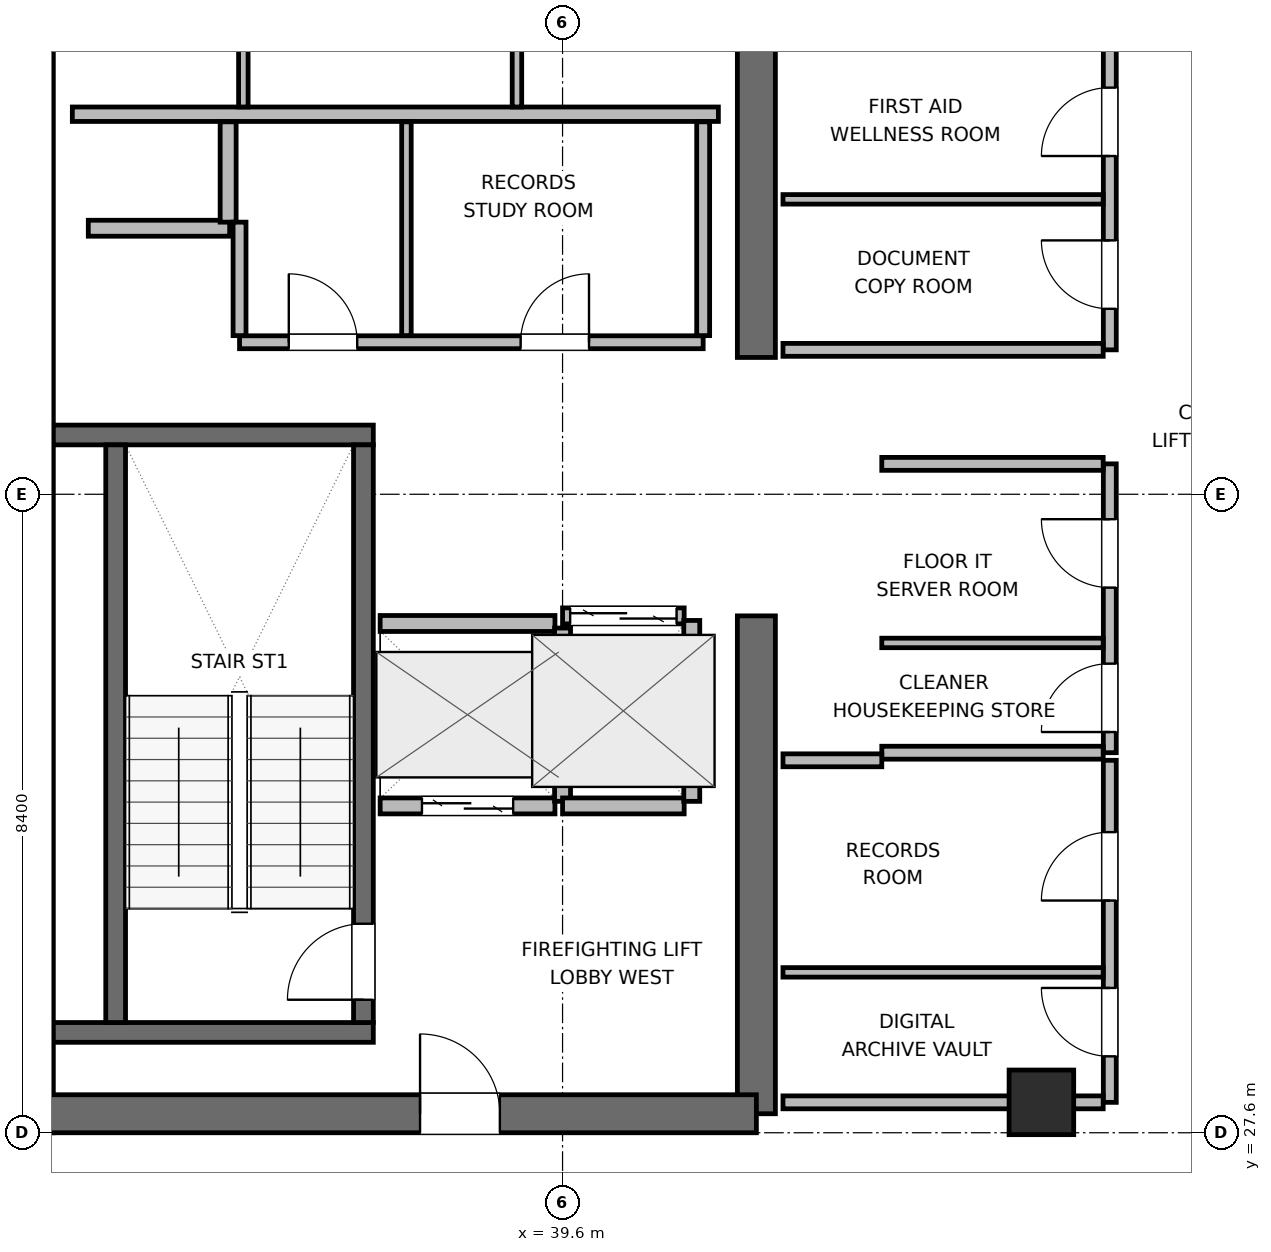
"""IFC4 building model, lengths in metres.
Left out: names, types, materials, properties, quantities, classifications, styles, units other than length and angle.
Written with IfcOpenShell. Run it as: python <this file> out.ifc"""

import sys

from ifc_helpers import new_model, si_unit, direction, frame, frame_2d, origin, origin_2d, place, context, subcontext, project, spatial, rectangle, extrude, element, fill, save


model = new_model("IFC4")
c1 = context("Model", 3, precision=1e-05, world=origin(), true_north=direction((0.0, 1.0)))
c2 = subcontext(c1, "Body", "Model", "MODEL_VIEW")
j1 = project(units=[si_unit("LENGTHUNIT", "METRE"), si_unit("PLANEANGLEUNIT", "RADIAN")], contexts=[c1])
p1 = place(None, origin())
s1 = spatial("IfcSite", under=j1, at=p1, CompositionType="ELEMENT")
p2 = place(p1, origin())
s2 = spatial("IfcBuilding", under=s1, at=p2, CompositionType="ELEMENT")
p3 = place(p2, frame((0.0, 0.0, 270.6)))
s3 = spatial("IfcBuildingStorey", under=s2, at=p3, CompositionType="ELEMENT", Elevation=270.6)
p4 = place(p3, frame((32.65, 27.6, 0.0), z_axis=(0.0, 0.0, 1.0), x_axis=(0.0, 1.0, 0.0)))
e1 = element("IfcWall", 1, at=p4, inside=s3, PredefinedType="SHEAR", context=c2, shape_type="SweptSolid", body=[
    extrude(rectangle(XDim=16.8, YDim=0.5, at=frame_2d((8.4, 0.0))), origin(), (0.0, 0.0, 1.0), 3.9),
])
p5 = place(p3, frame((42.15, 27.85, 0.0), z_axis=(0.0, 0.0, 1.0), x_axis=(0.0, 1.0, 0.0)))
e2 = element("IfcWall", 2, at=p5, inside=s3, PredefinedType="SHEAR", context=c2, shape_type="SweptSolid", body=[
    extrude(rectangle(XDim=6.55, YDim=0.5, at=frame_2d((3.275, 0.0))), origin(), (0.0, 0.0, 1.0), 3.9),
])
p6 = place(p3, frame((42.15, 37.8, 0.0), z_axis=(0.0, 0.0, 1.0), x_axis=(0.0, 1.0, 0.0)))
e3 = element("IfcWall", 3, at=p6, inside=s3, PredefinedType="SHEAR", context=c2, shape_type="SweptSolid", body=[
    extrude(rectangle(XDim=6.35, YDim=0.5, at=frame_2d((3.175, 0.0))), origin(), (0.0, 0.0, 1.0), 3.9),
])
p7 = place(p3, frame((32.65, 27.85, 0.0), z_axis=(0.0, 0.0, 1.0), x_axis=(1.0, 0.0, 0.0)))
e4 = element("IfcWall", 4, at=p7, inside=s3, PredefinedType="SHEAR", context=c2, shape_type="SweptSolid", body=[
    extrude(rectangle(XDim=9.5, YDim=0.5, at=frame_2d((4.75, 0.0))), origin(), (0.0, 0.0, 1.0), 3.9),
])
p8 = place(p7, frame((5.075, 0.0, 0.0)))
e5 = element("IfcOpeningElement", 5, at=p8, cuts=e4, PredefinedType="OPENING", context=c2, shape_type="SweptSolid", body=[
    extrude(rectangle(XDim=1.05, YDim=2.04, at=frame_2d((0.525, 1.02))), frame((0.0, 0.26, 0.0), z_axis=(0.0, -1.0, 0.0), x_axis=(1.0, 0.0, 0.0)), (0.0, 0.0, 1.0), 0.52),
])
for number, where, z_axis, x_axis in (
    (6, (32.9, 28.92, 0.0), (0.0, 0.0, 1.0), (1.0, 0.0, 0.0)),
    (7, (32.9, 36.78, 0.0), (0.0, 0.0, 1.0), (1.0, 0.0, 0.0)),
):
    element("IfcWall", number, at=place(p3, frame(where, z_axis=z_axis, x_axis=x_axis)), inside=s3, PredefinedType="SHEAR", context=c2, shape_type="SweptSolid", body=[
        extrude(rectangle(XDim=4.21, YDim=0.26, at=frame_2d((2.105, 0.0))), origin(), (0.0, 0.0, 1.0), 3.9),
    ])
p9 = place(p3, frame((33.72, 29.05, 0.0), z_axis=(0.0, 0.0, 1.0), x_axis=(0.0, 1.0, 0.0)))
e8 = element("IfcWall", 8, at=p9, inside=s3, PredefinedType="SHEAR", context=c2, shape_type="SweptSolid", body=[
    extrude(rectangle(XDim=7.6, YDim=0.26, at=frame_2d((3.8, 0.0))), origin(), (0.0, 0.0, 1.0), 3.9),
])
p10 = place(p3, frame((36.98, 29.05, 0.0), z_axis=(0.0, 0.0, 1.0), x_axis=(0.0, 1.0, 0.0)))
e9 = element("IfcWall", 9, at=p10, inside=s3, PredefinedType="SHEAR", context=c2, shape_type="SweptSolid", body=[
    extrude(rectangle(XDim=7.6, YDim=0.26, at=frame_2d((3.8, 0.0))), origin(), (0.0, 0.0, 1.0), 3.9),
])
p11 = place(p10, frame((0.3, 0.0, 0.0)))
e10 = element("IfcOpeningElement", 10, at=p11, cuts=e9, PredefinedType="OPENING", context=c2, shape_type="SweptSolid", body=[
    extrude(rectangle(XDim=1.0, YDim=2.04, at=frame_2d((0.5, 1.02))), frame((0.0, 0.14, 0.0), z_axis=(0.0, -1.0, 0.0), x_axis=(1.0, 0.0, 0.0)), (0.0, 0.0, 1.0), 0.28),
])
p12 = place(p3, frame((45.9, 28.0, 0.0), z_axis=(0.0, 0.0, 1.0), x_axis=(1.0, 0.0, 0.0)))
e11 = element("IfcColumn", 11, at=p12, inside=s3, PredefinedType="COLUMN", context=c2, shape_type="SweptSolid", body=[
    extrude(rectangle(XDim=0.85, YDim=0.85, at=origin_2d()), origin(), (0.0, 0.0, 1.0), 3.9),
])
p13 = place(p3, frame((33.15, 41.0, 0.0), z_axis=(0.0, 0.0, 1.0), x_axis=(1.0, 0.0, 0.0)))
e12 = element("IfcWall", 12, at=p13, inside=s3, PredefinedType="PLUMBINGWALL", context=c2, shape_type="SweptSolid", body=[
    extrude(rectangle(XDim=8.5, YDim=0.19, at=frame_2d((4.25, 0.0))), origin(), (0.0, 0.0, 1.0), 3.68),
])
for number, where, z_axis, x_axis in (
    (13, (35.4, 41.095, 0.0), (0.0, 0.0, 1.0), (0.0, 1.0, 0.0)),
    (14, (39.0, 41.095, 0.0), (0.0, 0.0, 1.0), (0.0, 1.0, 0.0)),
):
    element("IfcWall", number, at=place(p3, frame(where, z_axis=z_axis, x_axis=x_axis)), inside=s3, PredefinedType="PARTITIONING", context=c2, shape_type="SweptSolid", body=[
        extrude(rectangle(XDim=2.555, YDim=0.125, at=frame_2d((1.277, 0.0))), origin(), (0.0, 0.0, 1.0), 3.68),
    ])
p14 = place(p3, frame((33.36, 39.5, 0.0), z_axis=(0.0, 0.0, 1.0), x_axis=(1.0, 0.0, 0.0)))
e15 = element("IfcWall", 15, at=p14, inside=s3, PredefinedType="PARTITIONING", context=c2, shape_type="SweptSolid", body=[
    extrude(rectangle(XDim=1.86, YDim=0.21, at=frame_2d((0.93, 0.0))), origin(), (0.0, 0.0, 1.0), 3.68),
])
p15 = place(p3, frame((35.2, 39.58, 0.0), z_axis=(0.0, 0.0, 1.0), x_axis=(0.0, 1.0, 0.0)))
e16 = element("IfcWall", 16, at=p15, inside=s3, PredefinedType="PARTITIONING", context=c2, shape_type="SweptSolid", body=[
    extrude(rectangle(XDim=1.32, YDim=0.21, at=frame_2d((0.66, 0.0))), origin(), (0.0, 0.0, 1.0), 3.68),
])
p16 = place(p3, frame((37.2, 31.9, 0.0), z_axis=(0.0, 0.0, 1.0), x_axis=(1.0, 0.0, 0.0)))
e17 = element("IfcWall", 17, at=p16, inside=s3, PredefinedType="PARTITIONING", context=c2, shape_type="SweptSolid", body=[
    extrude(rectangle(XDim=2.3, YDim=0.21, at=frame_2d((1.15, 0.0))), origin(), (0.0, 0.0, 1.0), 3.68),
])
p17 = place(p16, frame((0.55, 0.0, 0.0)))
e18 = element("IfcOpeningElement", 18, at=p17, cuts=e17, PredefinedType="OPENING", context=c2, shape_type="SweptSolid", body=[
    extrude(rectangle(XDim=1.2, YDim=2.04, at=frame_2d((0.6, 1.02))), frame((0.0, 0.115, 0.0), z_axis=(0.0, -1.0, 0.0), x_axis=(1.0, 0.0, 0.0)), (0.0, 0.0, 1.0), 0.23),
])
p18 = place(p3, frame((37.2, 34.3, 0.0), z_axis=(0.0, 0.0, 1.0), x_axis=(1.0, 0.0, 0.0)))
e19 = element("IfcWall", 19, at=p18, inside=s3, PredefinedType="PARTITIONING", context=c2, shape_type="SweptSolid", body=[
    extrude(rectangle(XDim=2.3, YDim=0.21, at=frame_2d((1.15, 0.0))), origin(), (0.0, 0.0, 1.0), 3.68),
])
p19 = place(p3, frame((39.6, 31.96, 0.0), z_axis=(0.0, 0.0, 1.0), x_axis=(0.0, 1.0, 0.0)))
e20 = element("IfcWall", 20, at=p19, inside=s3, PredefinedType="PARTITIONING", context=c2, shape_type="SweptSolid", body=[
    extrude(rectangle(XDim=2.28, YDim=0.21, at=frame_2d((1.14, 0.0))), origin(), (0.0, 0.0, 1.0), 3.68),
])
p20 = place(p3, frame((39.6, 34.4, 0.0), z_axis=(0.0, 0.0, 1.0), x_axis=(1.0, 0.0, 0.0)))
e21 = element("IfcWall", 21, at=p20, inside=s3, PredefinedType="PARTITIONING", context=c2, shape_type="SweptSolid", body=[
    extrude(rectangle(XDim=1.6, YDim=0.21, at=frame_2d((0.8, 0.0))), origin(), (0.0, 0.0, 1.0), 3.68),
])
p21 = place(p20, frame((0.1, 0.0, 0.0)))
e22 = element("IfcOpeningElement", 22, at=p21, cuts=e21, PredefinedType="OPENING", context=c2, shape_type="SweptSolid", body=[
    extrude(rectangle(XDim=1.4, YDim=2.06, at=frame_2d((0.7, 1.03))), frame((0.0, 0.115, 0.0), z_axis=(0.0, -1.0, 0.0), x_axis=(1.0, 0.0, 0.0)), (0.0, 0.0, 1.0), 0.23),
])
p22 = place(p3, frame((39.6, 31.9, 0.0), z_axis=(0.0, 0.0, 1.0), x_axis=(1.0, 0.0, 0.0)))
e23 = element("IfcWall", 23, at=p22, inside=s3, PredefinedType="PARTITIONING", context=c2, shape_type="SweptSolid", body=[
    extrude(rectangle(XDim=1.6, YDim=0.21, at=frame_2d((0.8, 0.0))), origin(), (0.0, 0.0, 1.0), 3.68),
])
p23 = place(p3, frame((41.3, 31.96, 0.0), z_axis=(0.0, 0.0, 1.0), x_axis=(0.0, 1.0, 0.0)))
e24 = element("IfcWall", 24, at=p23, inside=s3, PredefinedType="PARTITIONING", context=c2, shape_type="SweptSolid", body=[
    extrude(rectangle(XDim=2.38, YDim=0.21, at=frame_2d((1.19, 0.0))), origin(), (0.0, 0.0, 1.0), 3.68),
])
p24 = place(p3, frame((35.35, 38.0, 0.0), z_axis=(0.0, 0.0, 1.0), x_axis=(1.0, 0.0, 0.0)))
e25 = element("IfcWall", 25, at=p24, inside=s3, PredefinedType="PARTITIONING", context=c2, shape_type="SweptSolid", body=[
    extrude(rectangle(XDim=6.1, YDim=0.17, at=frame_2d((3.05, 0.0))), origin(), (0.0, 0.0, 1.0), 3.68),
])
p25 = place(p24, frame((0.648, 0.0, 0.0)))
e26 = element("IfcOpeningElement", 26, at=p25, cuts=e25, PredefinedType="OPENING", context=c2, shape_type="SweptSolid", body=[
    extrude(rectangle(XDim=0.9, YDim=2.02, at=frame_2d((0.45, 1.01))), frame((0.0, 0.095, 0.0), z_axis=(0.0, -1.0, 0.0), x_axis=(1.0, 0.0, 0.0)), (0.0, 0.0, 1.0), 0.19),
])
p26 = place(p24, frame((3.698, 0.0, 0.0)))
e27 = element("IfcOpeningElement", 27, at=p26, cuts=e25, PredefinedType="OPENING", context=c2, shape_type="SweptSolid", body=[
    extrude(rectangle(XDim=0.9, YDim=2.02, at=frame_2d((0.45, 1.01))), frame((0.0, 0.095, 0.0), z_axis=(0.0, -1.0, 0.0), x_axis=(1.0, 0.0, 0.0)), (0.0, 0.0, 1.0), 0.19),
])
p27 = place(p3, frame((35.35, 38.087, 0.0), z_axis=(0.0, 0.0, 1.0), x_axis=(0.0, 1.0, 0.0)))
e28 = element("IfcWall", 28, at=p27, inside=s3, PredefinedType="PARTITIONING", context=c2, shape_type="SweptSolid", body=[
    extrude(rectangle(XDim=1.493, YDim=0.17, at=frame_2d((0.747, 0.0))), origin(), (0.0, 0.0, 1.0), 3.68),
])
p28 = place(p3, frame((41.45, 38.087, 0.0), z_axis=(0.0, 0.0, 1.0), x_axis=(0.0, 1.0, 0.0)))
e29 = element("IfcWall", 29, at=p28, inside=s3, PredefinedType="PARTITIONING", context=c2, shape_type="SweptSolid", body=[
    extrude(rectangle(XDim=2.813, YDim=0.17, at=frame_2d((1.406, 0.0))), origin(), (0.0, 0.0, 1.0), 3.68),
])
p29 = place(p3, frame((37.546, 38.087, 0.0), z_axis=(0.0, 0.0, 1.0), x_axis=(0.0, 1.0, 0.0)))
e30 = element("IfcWall", 30, at=p29, inside=s3, PredefinedType="PARTITIONING", context=c2, shape_type="SweptSolid", body=[
    extrude(rectangle(XDim=2.813, YDim=0.125, at=frame_2d((1.406, 0.0))), origin(), (0.0, 0.0, 1.0), 3.68),
])
p30 = place(p3, frame((46.8, 32.6, 0.0), z_axis=(0.0, 0.0, 1.0), x_axis=(0.0, 1.0, 0.0)))
e31 = element("IfcWall", 31, at=p30, inside=s3, PredefinedType="PARTITIONING", context=c2, shape_type="SweptSolid", body=[
    extrude(rectangle(XDim=3.8, YDim=0.17, at=frame_2d((1.9, 0.0))), origin(), (0.0, 0.0, 1.0), 3.68),
])
p31 = place(p30, frame((0.272, 0.0, 0.0)))
e32 = element("IfcOpeningElement", 32, at=p31, cuts=e31, PredefinedType="OPENING", context=c2, shape_type="SweptSolid", body=[
    extrude(rectangle(XDim=0.9, YDim=2.02, at=frame_2d((0.45, 1.01))), frame((0.0, 0.095, 0.0), z_axis=(0.0, -1.0, 0.0), x_axis=(1.0, 0.0, 0.0)), (0.0, 0.0, 1.0), 0.19),
])
p32 = place(p30, frame((2.172, 0.0, 0.0)))
e33 = element("IfcOpeningElement", 33, at=p32, cuts=e31, PredefinedType="OPENING", context=c2, shape_type="SweptSolid", body=[
    extrude(rectangle(XDim=0.9, YDim=2.02, at=frame_2d((0.45, 1.01))), frame((0.0, 0.095, 0.0), z_axis=(0.0, -1.0, 0.0), x_axis=(1.0, 0.0, 0.0)), (0.0, 0.0, 1.0), 0.19),
])
for number, where, z_axis, x_axis in (
    (34, (43.8, 32.6, 0.0), (0.0, 0.0, 1.0), (1.0, 0.0, 0.0)),
    (35, (43.8, 36.4, 0.0), (0.0, 0.0, 1.0), (1.0, 0.0, 0.0)),
):
    element("IfcWall", number, at=place(p3, frame(where, z_axis=z_axis, x_axis=x_axis)), inside=s3, PredefinedType="PARTITIONING", context=c2, shape_type="SweptSolid", body=[
        extrude(rectangle(XDim=2.913, YDim=0.17, at=frame_2d((1.457, 0.0))), origin(), (0.0, 0.0, 1.0), 3.68),
    ])
p33 = place(p3, frame((43.8, 34.044, 0.0), z_axis=(0.0, 0.0, 1.0), x_axis=(1.0, 0.0, 0.0)))
e36 = element("IfcWall", 36, at=p33, inside=s3, PredefinedType="PARTITIONING", context=c2, shape_type="SweptSolid", body=[
    extrude(rectangle(XDim=2.913, YDim=0.125, at=frame_2d((1.457, 0.0))), origin(), (0.0, 0.0, 1.0), 3.68),
])
p34 = place(p3, frame((46.8, 28.0, 0.0), z_axis=(0.0, 0.0, 1.0), x_axis=(0.0, 1.0, 0.0)))
e37 = element("IfcWall", 37, at=p34, inside=s3, PredefinedType="PARTITIONING", context=c2, shape_type="SweptSolid", body=[
    extrude(rectangle(XDim=4.5, YDim=0.17, at=frame_2d((2.25, 0.0))), origin(), (0.0, 0.0, 1.0), 3.68),
])
p35 = place(p34, frame((0.605, 0.0, 0.0)))
e38 = element("IfcOpeningElement", 38, at=p35, cuts=e37, PredefinedType="OPENING", context=c2, shape_type="SweptSolid", body=[
    extrude(rectangle(XDim=0.9, YDim=2.02, at=frame_2d((0.45, 1.01))), frame((0.0, 0.095, 0.0), z_axis=(0.0, -1.0, 0.0), x_axis=(1.0, 0.0, 0.0)), (0.0, 0.0, 1.0), 0.19),
])
p36 = place(p34, frame((2.655, 0.0, 0.0)))
e39 = element("IfcOpeningElement", 39, at=p36, cuts=e37, PredefinedType="OPENING", context=c2, shape_type="SweptSolid", body=[
    extrude(rectangle(XDim=0.9, YDim=2.02, at=frame_2d((0.45, 1.01))), frame((0.0, 0.095, 0.0), z_axis=(0.0, -1.0, 0.0), x_axis=(1.0, 0.0, 0.0)), (0.0, 0.0, 1.0), 0.19),
])
p37 = place(p3, frame((42.5, 28.0, 0.0), z_axis=(0.0, 0.0, 1.0), x_axis=(1.0, 0.0, 0.0)))
e40 = element("IfcWall", 40, at=p37, inside=s3, PredefinedType="PARTITIONING", context=c2, shape_type="SweptSolid", body=[
    extrude(rectangle(XDim=4.213, YDim=0.17, at=frame_2d((2.106, 0.0))), origin(), (0.0, 0.0, 1.0), 2.765),
])
p38 = place(p3, frame((42.5, 32.5, 0.0), z_axis=(0.0, 0.0, 1.0), x_axis=(1.0, 0.0, 0.0)))
e41 = element("IfcWall", 41, at=p38, inside=s3, PredefinedType="PARTITIONING", context=c2, shape_type="SweptSolid", body=[
    extrude(rectangle(XDim=1.3, YDim=0.17, at=frame_2d((0.65, 0.0))), origin(), (0.0, 0.0, 1.0), 3.68),
])
p39 = place(p3, frame((42.5, 29.71, 0.0), z_axis=(0.0, 0.0, 1.0), x_axis=(1.0, 0.0, 0.0)))
e42 = element("IfcWall", 42, at=p39, inside=s3, PredefinedType="PARTITIONING", context=c2, shape_type="SweptSolid", body=[
    extrude(rectangle(XDim=4.213, YDim=0.125, at=frame_2d((2.106, 0.0))), origin(), (0.0, 0.0, 1.0), 3.68),
])
p40 = place(p3, frame((46.8, 37.9, 0.0), z_axis=(0.0, 0.0, 1.0), x_axis=(0.0, 1.0, 0.0)))
e43 = element("IfcWall", 43, at=p40, inside=s3, PredefinedType="PARTITIONING", context=c2, shape_type="SweptSolid", body=[
    extrude(rectangle(XDim=6.0, YDim=0.17, at=frame_2d((3.0, 0.0))), origin(), (0.0, 0.0, 1.0), 3.68),
])
p41 = place(p40, frame((0.54, 0.0, 0.0)))
e44 = element("IfcOpeningElement", 44, at=p41, cuts=e43, PredefinedType="OPENING", context=c2, shape_type="SweptSolid", body=[
    extrude(rectangle(XDim=0.9, YDim=2.02, at=frame_2d((0.45, 1.01))), frame((0.0, 0.095, 0.0), z_axis=(0.0, -1.0, 0.0), x_axis=(1.0, 0.0, 0.0)), (0.0, 0.0, 1.0), 0.19),
])
p42 = place(p40, frame((2.55, 0.0, 0.0)))
e45 = element("IfcOpeningElement", 45, at=p42, cuts=e43, PredefinedType="OPENING", context=c2, shape_type="SweptSolid", body=[
    extrude(rectangle(XDim=0.9, YDim=2.02, at=frame_2d((0.45, 1.01))), frame((0.0, 0.095, 0.0), z_axis=(0.0, -1.0, 0.0), x_axis=(1.0, 0.0, 0.0)), (0.0, 0.0, 1.0), 0.19),
])
p43 = place(p40, frame((4.56, 0.0, 0.0)))
e46 = element("IfcOpeningElement", 46, at=p43, cuts=e43, PredefinedType="OPENING", context=c2, shape_type="SweptSolid", body=[
    extrude(rectangle(XDim=0.9, YDim=2.02, at=frame_2d((0.45, 1.01))), frame((0.0, 0.095, 0.0), z_axis=(0.0, -1.0, 0.0), x_axis=(1.0, 0.0, 0.0)), (0.0, 0.0, 1.0), 0.19),
])
p44 = place(p3, frame((42.5, 37.9, 0.0), z_axis=(0.0, 0.0, 1.0), x_axis=(1.0, 0.0, 0.0)))
e47 = element("IfcWall", 47, at=p44, inside=s3, PredefinedType="PARTITIONING", context=c2, shape_type="SweptSolid", body=[
    extrude(rectangle(XDim=4.213, YDim=0.17, at=frame_2d((2.106, 0.0))), origin(), (0.0, 0.0, 1.0), 3.68),
])
p45 = place(p3, frame((42.5, 39.88, 0.0), z_axis=(0.0, 0.0, 1.0), x_axis=(1.0, 0.0, 0.0)))
e48 = element("IfcWall", 48, at=p45, inside=s3, PredefinedType="PARTITIONING", context=c2, shape_type="SweptSolid", body=[
    extrude(rectangle(XDim=4.213, YDim=0.125, at=frame_2d((2.106, 0.0))), origin(), (0.0, 0.0, 1.0), 3.68),
])
p46 = place(p11, origin())
e49 = element("IfcDoor", 49, at=p46, inside=s3, OperationType="SINGLE_SWING_LEFT", PredefinedType="DOOR", context=c2, shape_type="SweptSolid", body=[
    extrude(rectangle(XDim=1.0, YDim=2.04, at=frame_2d((0.5, 1.02))), frame((0.0, 0.025, 0.0), z_axis=(0.0, -1.0, 0.0), x_axis=(1.0, 0.0, 0.0)), (0.0, 0.0, 1.0), 0.05),
])
fill(e10, e49)
p47 = place(p17, origin())
e50 = element("IfcDoor", 50, at=p47, inside=s3, OperationType="DOUBLE_DOOR_SLIDING", PredefinedType="DOOR", context=c2, shape_type="SweptSolid", body=[
    extrude(rectangle(XDim=1.2, YDim=2.04, at=frame_2d((0.6, 1.02))), frame((0.0, 0.025, 0.0), z_axis=(0.0, -1.0, 0.0), x_axis=(1.0, 0.0, 0.0)), (0.0, 0.0, 1.0), 0.05),
])
fill(e18, e50)
p48 = place(p21, origin())
e51 = element("IfcDoor", 51, at=p48, inside=s3, OperationType="DOUBLE_DOOR_SLIDING", PredefinedType="DOOR", context=c2, shape_type="SweptSolid", body=[
    extrude(rectangle(XDim=1.4, YDim=2.06, at=frame_2d((0.7, 1.03))), frame((0.0, 0.025, 0.0), z_axis=(0.0, -1.0, 0.0), x_axis=(1.0, 0.0, 0.0)), (0.0, 0.0, 1.0), 0.05),
])
fill(e22, e51)
p49 = place(p8, origin())
e52 = element("IfcDoor", 52, at=p49, inside=s3, OperationType="SINGLE_SWING_LEFT", PredefinedType="DOOR", context=c2, shape_type="SweptSolid", body=[
    extrude(rectangle(XDim=1.05, YDim=2.04, at=frame_2d((0.525, 1.02))), frame((0.0, 0.025, 0.0), z_axis=(0.0, -1.0, 0.0), x_axis=(1.0, 0.0, 0.0)), (0.0, 0.0, 1.0), 0.05),
])
fill(e5, e52)
p50 = place(p25, origin())
e53 = element("IfcDoor", 53, at=p50, inside=s3, OperationType="SINGLE_SWING_LEFT", PredefinedType="DOOR", context=c2, shape_type="SweptSolid", body=[
    extrude(rectangle(XDim=0.9, YDim=2.02, at=frame_2d((0.45, 1.01))), frame((0.0, 0.025, 0.0), z_axis=(0.0, -1.0, 0.0), x_axis=(1.0, 0.0, 0.0)), (0.0, 0.0, 1.0), 0.05),
])
fill(e26, e53)
p51 = place(p26, origin())
e54 = element("IfcDoor", 54, at=p51, inside=s3, OperationType="SINGLE_SWING_RIGHT", PredefinedType="DOOR", context=c2, shape_type="SweptSolid", body=[
    extrude(rectangle(XDim=0.9, YDim=2.02, at=frame_2d((0.45, 1.01))), frame((0.0, 0.025, 0.0), z_axis=(0.0, -1.0, 0.0), x_axis=(1.0, 0.0, 0.0)), (0.0, 0.0, 1.0), 0.05),
])
fill(e27, e54)
p52 = place(p31, origin())
e55 = element("IfcDoor", 55, at=p52, inside=s3, OperationType="SINGLE_SWING_LEFT", PredefinedType="DOOR", context=c2, shape_type="SweptSolid", body=[
    extrude(rectangle(XDim=0.9, YDim=2.02, at=frame_2d((0.45, 1.01))), frame((0.0, 0.025, 0.0), z_axis=(0.0, -1.0, 0.0), x_axis=(1.0, 0.0, 0.0)), (0.0, 0.0, 1.0), 0.05),
])
fill(e32, e55)
p53 = place(p32, origin())
e56 = element("IfcDoor", 56, at=p53, inside=s3, OperationType="SINGLE_SWING_RIGHT", PredefinedType="DOOR", context=c2, shape_type="SweptSolid", body=[
    extrude(rectangle(XDim=0.9, YDim=2.02, at=frame_2d((0.45, 1.01))), frame((0.0, 0.025, 0.0), z_axis=(0.0, -1.0, 0.0), x_axis=(1.0, 0.0, 0.0)), (0.0, 0.0, 1.0), 0.05),
])
fill(e33, e56)
p54 = place(p35, origin())
e57 = element("IfcDoor", 57, at=p54, inside=s3, OperationType="SINGLE_SWING_RIGHT", PredefinedType="DOOR", context=c2, shape_type="SweptSolid", body=[
    extrude(rectangle(XDim=0.9, YDim=2.02, at=frame_2d((0.45, 1.01))), frame((0.0, 0.025, 0.0), z_axis=(0.0, -1.0, 0.0), x_axis=(1.0, 0.0, 0.0)), (0.0, 0.0, 1.0), 0.05),
])
fill(e38, e57)
p55 = place(p36, origin())
e58 = element("IfcDoor", 58, at=p55, inside=s3, OperationType="SINGLE_SWING_LEFT", PredefinedType="DOOR", context=c2, shape_type="SweptSolid", body=[
    extrude(rectangle(XDim=0.9, YDim=2.02, at=frame_2d((0.45, 1.01))), frame((0.0, 0.025, 0.0), z_axis=(0.0, -1.0, 0.0), x_axis=(1.0, 0.0, 0.0)), (0.0, 0.0, 1.0), 0.05),
])
fill(e39, e58)
p56 = place(p41, origin())
e59 = element("IfcDoor", 59, at=p56, inside=s3, OperationType="SINGLE_SWING_RIGHT", PredefinedType="DOOR", context=c2, shape_type="SweptSolid", body=[
    extrude(rectangle(XDim=0.9, YDim=2.02, at=frame_2d((0.45, 1.01))), frame((0.0, 0.025, 0.0), z_axis=(0.0, -1.0, 0.0), x_axis=(1.0, 0.0, 0.0)), (0.0, 0.0, 1.0), 0.05),
])
fill(e44, e59)
p57 = place(p42, origin())
e60 = element("IfcDoor", 60, at=p57, inside=s3, OperationType="SINGLE_SWING_LEFT", PredefinedType="DOOR", context=c2, shape_type="SweptSolid", body=[
    extrude(rectangle(XDim=0.9, YDim=2.02, at=frame_2d((0.45, 1.01))), frame((0.0, 0.025, 0.0), z_axis=(0.0, -1.0, 0.0), x_axis=(1.0, 0.0, 0.0)), (0.0, 0.0, 1.0), 0.05),
])
fill(e45, e60)
save(model, sys.argv[1])
